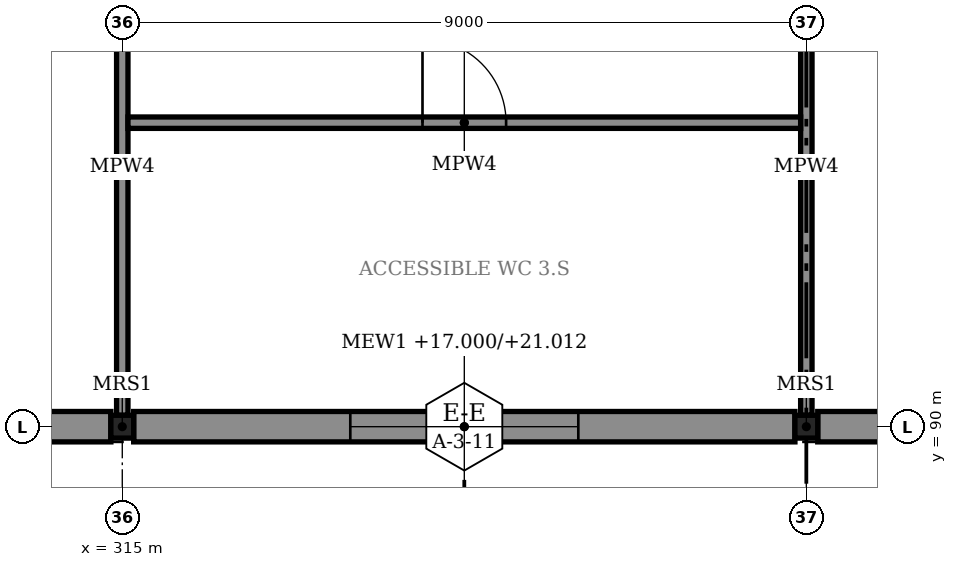
"""IFC4 building model, lengths in metres.
Left out: names, types, materials, properties, quantities, classifications, styles, units other than length and angle.
Written with IfcOpenShell. Run it as: python <this file> out.ifc"""

import sys

from ifc_helpers import new_model, si_unit, direction, frame, frame_2d, origin, origin_2d, place, context, subcontext, project, spatial, polyline, rectangle, hollow_rectangle, outline, extrude, element, fill, save


model = new_model("IFC4")
c1 = context("Model", 3, precision=1e-05, world=origin(), true_north=direction((0.0, 1.0)))
c2 = subcontext(c1, "Body", "Model", "MODEL_VIEW")
j1 = project(units=[si_unit("LENGTHUNIT", "METRE"), si_unit("PLANEANGLEUNIT", "RADIAN")], contexts=[c1])
p1 = place(None, origin())
s1 = spatial("IfcSite", under=j1, at=p1, CompositionType="ELEMENT")
p2 = place(p1, origin())
s2 = spatial("IfcBuilding", under=s1, at=p2, CompositionType="ELEMENT")
p3 = place(p2, frame((0.0, 0.0, 17.0)))
s3 = spatial("IfcBuildingStorey", under=s2, at=p3, CompositionType="ELEMENT", Elevation=17.0)
for number, where, z_axis, x_axis in (
    (1, (315.0, 90.0, 0.0), (0.0, 0.0, 1.0), (1.0, 0.0, 0.0)),
    (2, (324.0, 90.0, 0.0), (0.0, 0.0, 1.0), (1.0, 0.0, 0.0)),
):
    element("IfcColumn", number, at=place(p3, frame(where, z_axis=z_axis, x_axis=x_axis)), inside=s3, PredefinedType="COLUMN", context=c2, shape_type="SweptSolid", body=[
        extrude(hollow_rectangle(XDim=0.3, YDim=0.3, WallThickness=0.012, InnerFilletRadius=0.024, OuterFilletRadius=0.036, at=origin_2d()), origin(), (0.0, 0.0, 1.0), 3.1),
    ])
p4 = place(p3, frame((306.15, 90.0, 0.0), z_axis=(0.0, 0.0, 1.0), x_axis=(1.0, 0.0, 0.0)))
e3 = element("IfcWall", 3, at=p4, inside=s3, PredefinedType="STANDARD", context=c2, shape_type="SweptSolid", body=[
    extrude(outline(polyline([(0.0, 0.0), (8.7, 0.0), (8.7, 4.72), (0.0, 5.405), (0.0, 0.0)])), frame((0.0, 0.2, 0.0), z_axis=(0.0, -1.0, 0.0), x_axis=(1.0, 0.0, 0.0)), (0.0, 0.0, 1.0), 0.4),
])
p5 = place(p4, frame((2.85, 0.0, 0.9)))
e4 = element("IfcOpeningElement", 4, at=p5, cuts=e3, PredefinedType="OPENING", context=c2, shape_type="SweptSolid", body=[
    extrude(rectangle(XDim=3.0, YDim=2.1, at=frame_2d((1.5, 1.05))), frame((0.0, 0.21, 0.0), z_axis=(0.0, -1.0, 0.0), x_axis=(1.0, 0.0, 0.0)), (0.0, 0.0, 1.0), 0.42),
])
p6 = place(p3, frame((315.15, 90.0, 0.0), z_axis=(0.0, 0.0, 1.0), x_axis=(1.0, 0.0, 0.0)))
e5 = element("IfcWall", 5, at=p6, inside=s3, PredefinedType="STANDARD", context=c2, shape_type="SweptSolid", body=[
    extrude(outline(polyline([(0.0, 0.0), (8.7, 0.0), (8.7, 4.012), (0.0, 4.697), (0.0, 0.0)])), frame((0.0, 0.2, 0.0), z_axis=(0.0, -1.0, 0.0), x_axis=(1.0, 0.0, 0.0)), (0.0, 0.0, 1.0), 0.4),
])
p7 = place(p6, frame((2.85, 0.0, 0.9)))
e6 = element("IfcOpeningElement", 6, at=p7, cuts=e5, PredefinedType="OPENING", context=c2, shape_type="SweptSolid", body=[
    extrude(rectangle(XDim=3.0, YDim=2.1, at=frame_2d((1.5, 1.05))), frame((0.0, 0.21, 0.0), z_axis=(0.0, -1.0, 0.0), x_axis=(1.0, 0.0, 0.0)), (0.0, 0.0, 1.0), 0.42),
])
p8 = place(p3, frame((324.15, 90.0, 0.0), z_axis=(0.0, 0.0, 1.0), x_axis=(1.0, 0.0, 0.0)))
e7 = element("IfcWall", 7, at=p8, inside=s3, PredefinedType="STANDARD", context=c2, shape_type="SweptSolid", body=[
    extrude(outline(polyline([(0.0, 0.0), (8.7, 0.0), (8.7, 4.697), (0.0, 4.012), (0.0, 0.0)])), frame((0.0, 0.2, 0.0), z_axis=(0.0, -1.0, 0.0), x_axis=(1.0, 0.0, 0.0)), (0.0, 0.0, 1.0), 0.4),
])
p9 = place(p8, frame((2.85, 0.0, 0.9)))
e8 = element("IfcOpeningElement", 8, at=p9, cuts=e7, PredefinedType="OPENING", context=c2, shape_type="SweptSolid", body=[
    extrude(rectangle(XDim=3.0, YDim=2.1, at=frame_2d((1.5, 1.05))), frame((0.0, 0.21, 0.0), z_axis=(0.0, -1.0, 0.0), x_axis=(1.0, 0.0, 0.0)), (0.0, 0.0, 1.0), 0.42),
])
p10 = place(p3, frame((315.0, 90.15, 0.0), z_axis=(0.0, 0.0, 1.0), x_axis=(0.0, 1.0, 0.0)))
e9 = element("IfcWall", 9, at=p10, inside=s3, PredefinedType="PARTITIONING", context=c2, shape_type="SweptSolid", body=[
    extrude(rectangle(XDim=6.525, YDim=0.15, at=frame_2d((3.263, 0.0))), origin(), (0.0, 0.0, 1.0), 3.0),
])
p11 = place(p10, frame((4.8, 0.0, 0.0)))
e10 = element("IfcOpeningElement", 10, at=p11, cuts=e9, PredefinedType="OPENING", context=c2, shape_type="SweptSolid", body=[
    extrude(rectangle(XDim=0.9, YDim=2.1, at=frame_2d((0.45, 1.05))), frame((0.0, 0.085, 0.0), z_axis=(0.0, -1.0, 0.0), x_axis=(1.0, 0.0, 0.0)), (0.0, 0.0, 1.0), 0.17),
])
p12 = place(p3, frame((324.0, 90.15, 0.0), z_axis=(0.0, 0.0, 1.0), x_axis=(0.0, 1.0, 0.0)))
e11 = element("IfcWall", 11, at=p12, inside=s3, PredefinedType="PARTITIONING", context=c2, shape_type="SweptSolid", body=[
    extrude(rectangle(XDim=6.525, YDim=0.15, at=frame_2d((3.263, 0.0))), origin(), (0.0, 0.0, 1.0), 3.0),
])
p13 = place(p12, frame((4.8, 0.0, 0.0)))
e12 = element("IfcOpeningElement", 12, at=p13, cuts=e11, PredefinedType="OPENING", context=c2, shape_type="SweptSolid", body=[
    extrude(rectangle(XDim=0.9, YDim=2.1, at=frame_2d((0.45, 1.05))), frame((0.0, 0.085, 0.0), z_axis=(0.0, -1.0, 0.0), x_axis=(1.0, 0.0, 0.0)), (0.0, 0.0, 1.0), 0.17),
])
p14 = place(p3, frame((315.075, 94.0, 0.0), z_axis=(0.0, 0.0, 1.0), x_axis=(1.0, 0.0, 0.0)))
e13 = element("IfcWall", 13, at=p14, inside=s3, PredefinedType="PARTITIONING", context=c2, shape_type="SweptSolid", body=[
    extrude(rectangle(XDim=8.85, YDim=0.15, at=frame_2d((4.425, 0.0))), origin(), (0.0, 0.0, 1.0), 3.0),
])
p15 = place(p14, frame((3.875, 0.0, 0.0)))
e14 = element("IfcOpeningElement", 14, at=p15, cuts=e13, PredefinedType="OPENING", context=c2, shape_type="SweptSolid", body=[
    extrude(rectangle(XDim=1.1, YDim=2.1, at=frame_2d((0.55, 1.05))), frame((0.0, 0.085, 0.0), z_axis=(0.0, -1.0, 0.0), x_axis=(1.0, 0.0, 0.0)), (0.0, 0.0, 1.0), 0.17),
])
p16 = place(p7, origin())
e15 = element("IfcWindow", 15, at=p16, inside=s3, PartitioningType="TRIPLE_PANEL_VERTICAL", PredefinedType="WINDOW", context=c2, shape_type="SweptSolid", body=[
    extrude(rectangle(XDim=3.0, YDim=2.1, at=frame_2d((1.5, 1.05))), frame((0.0, 0.03, 0.0), z_axis=(0.0, -1.0, 0.0), x_axis=(1.0, 0.0, 0.0)), (0.0, 0.0, 1.0), 0.06),
])
fill(e6, e15)
p17 = place(p15, origin())
e16 = element("IfcDoor", 16, at=p17, inside=s3, OperationType="SINGLE_SWING_LEFT", PredefinedType="DOOR", context=c2, shape_type="SweptSolid", body=[
    extrude(rectangle(XDim=1.1, YDim=2.1, at=frame_2d((0.55, 1.05))), frame((0.0, 0.025, 0.0), z_axis=(0.0, -1.0, 0.0), x_axis=(1.0, 0.0, 0.0)), (0.0, 0.0, 1.0), 0.05),
])
fill(e14, e16)
save(model, sys.argv[1])
